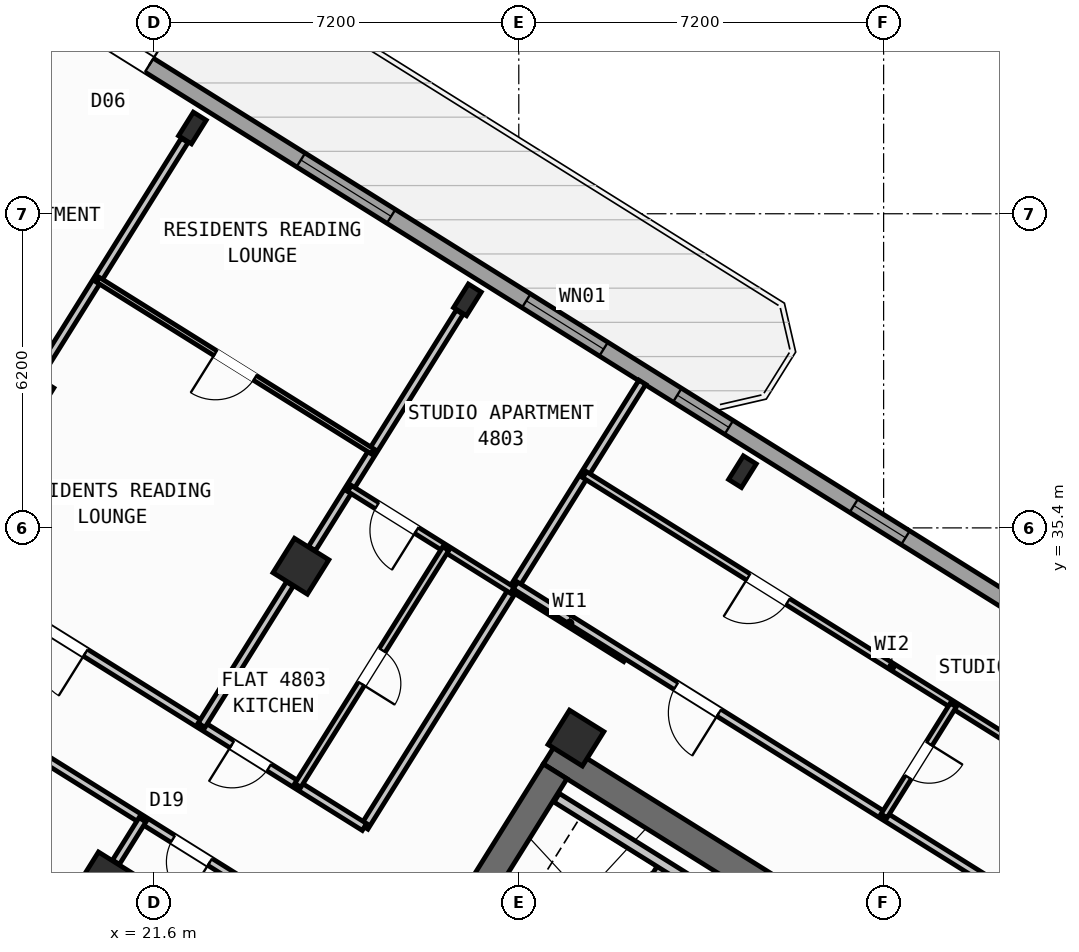
"""IFC4 building model, lengths in metres.
Left out: names, types, materials, properties, quantities, classifications, styles, units other than length and angle.
Written with IfcOpenShell. Run it as: python <this file> out.ifc"""

import sys

from ifc_helpers import new_model, si_unit, direction, frame, frame_2d, origin, origin_2d, place, context, subcontext, project, spatial, rectangle, hollow_rectangle, i_section, extrude, source, transform, mapped, element, fill, save


model = new_model("IFC4")
c1 = context("Model", 3, precision=1e-05, world=origin(), true_north=direction((0.0, 1.0)))
c2 = subcontext(c1, "Body", "Model", "MODEL_VIEW")
j1 = project(units=[si_unit("LENGTHUNIT", "METRE"), si_unit("PLANEANGLEUNIT", "RADIAN")], contexts=[c1])
p1 = place(None, origin())
s1 = spatial("IfcSite", under=j1, at=p1, CompositionType="ELEMENT")
p2 = place(p1, origin())
s2 = spatial("IfcBuilding", under=s1, at=p2, CompositionType="ELEMENT")
p3 = place(p2, frame((0.0, 0.0, 191.4)))
s3 = spatial("IfcBuildingStorey", under=s2, at=p3, CompositionType="ELEMENT", Elevation=191.4)
p4 = place(p3, frame((40.573, 24.01, 0.0), z_axis=(0.0, 0.0, 1.0), x_axis=(-0.848047359947, 0.529920442413, 0.0)))
e1 = element("IfcWall", 1, at=p4, inside=s3, PredefinedType="SHEAR", context=c2, shape_type="SweptSolid", body=[
    extrude(rectangle(XDim=13.14, YDim=0.55, at=frame_2d((6.57, 0.0))), origin(), (0.0, 0.0, 1.0), 3.32),
])
p5 = place(p3, frame((29.517, 30.594, 0.0), z_axis=(0.0, 0.0, 1.0), x_axis=(-0.529906864564, -0.848055844204, 0.0)))
e2 = element("IfcWall", 2, at=p5, inside=s3, PredefinedType="SHEAR", context=c2, shape_type="SweptSolid", body=[
    extrude(rectangle(XDim=3.575, YDim=0.55, at=frame_2d((1.788, 0.0))), origin(), (0.0, 0.0, 1.0), 3.32),
])
m1 = source(origin(), c2, "Body", "SweptSolid", [
    extrude(i_section(OverallWidth=0.3, OverallDepth=0.55, WebThickness=0.015, FlangeThickness=0.029, at=origin_2d()), origin(), (0.0, 0.0, 1.0), 3.6),
])
p6 = place(p3, frame((33.213, 36.509, 0.0), z_axis=(0.0, 0.0, 1.0), x_axis=(-0.848048096156, 0.529919264233, 0.0)))
e3 = element("IfcColumn", 3, at=p6, inside=s3, PredefinedType="COLUMN", context=c2, shape_type="MappedRepresentation", body=[
    mapped(m1, transform((0.0, 0.0, 0.0), scale=1.0)),
])
m2 = source(origin(), c2, "Body", "SweptSolid", [
    extrude(hollow_rectangle(XDim=0.8, YDim=0.8, WallThickness=0.032, at=origin_2d()), origin(), (0.0, 0.0, 1.0), 3.6),
])
p7 = place(p3, frame((29.928, 31.251, 0.0), z_axis=(0.0, 0.0, 1.0), x_axis=(-0.848048096156, 0.529919264233, 0.0)))
e4 = element("IfcColumn", 4, at=p7, inside=s3, PredefinedType="COLUMN", context=c2, shape_type="MappedRepresentation", body=[
    mapped(m2, transform((0.0, 0.0, 0.0), scale=1.0)),
])
p8 = place(p3, frame((27.786, 39.901, 0.0), z_axis=(0.0, 0.0, 1.0), x_axis=(-0.848048096156, 0.529919264233, 0.0)))
e5 = element("IfcColumn", 5, at=p8, inside=s3, PredefinedType="COLUMN", context=c2, shape_type="MappedRepresentation", body=[
    mapped(m1, transform((0.0, 0.0, 0.0), scale=1.0)),
])
for number, where, z_axis, x_axis in (
    (6, (24.5, 34.643, 0.0), (0.0, 0.0, 1.0), (-0.848, 0.53, 0.0)),
    (7, (20.632, 28.452, 0.0), (0.0, 0.0, 1.0), (-0.848, 0.53, 0.0)),
):
    element("IfcColumn", number, at=place(p3, frame(where, z_axis=z_axis, x_axis=x_axis)), inside=s3, PredefinedType="COLUMN", context=c2, shape_type="MappedRepresentation", body=[
        mapped(m2, transform((0.0, 0.0, 0.0), scale=1.0)),
    ])
p9 = place(p3, frame((22.358, 43.292, 0.0), z_axis=(0.0, 0.0, 1.0), x_axis=(-0.848048096156, 0.529919264233, 0.0)))
e8 = element("IfcColumn", 8, at=p9, inside=s3, PredefinedType="COLUMN", context=c2, shape_type="MappedRepresentation", body=[
    mapped(m1, transform((0.0, 0.0, 0.0), scale=1.0)),
])
p10 = place(p3, frame((19.073, 38.034, 0.0), z_axis=(0.0, 0.0, 1.0), x_axis=(-0.848048096156, 0.529919264233, 0.0)))
e9 = element("IfcColumn", 9, at=p10, inside=s3, PredefinedType="COLUMN", context=c2, shape_type="MappedRepresentation", body=[
    mapped(m2, transform((0.0, 0.0, 0.0), scale=1.0)),
])
p11 = place(p3, frame((17.424, 47.083, 0.0), z_axis=(0.0, 0.0, 1.0), x_axis=(0.848049927979, -0.529916332693, 0.0)))
e10 = element("IfcWall", 10, at=p11, inside=s3, PredefinedType="STANDARD", context=c2, shape_type="SweptSolid", body=[
    extrude(rectangle(XDim=29.223, YDim=0.32, at=frame_2d((14.612, 0.0))), origin(), (0.0, 0.0, 1.0), 3.32),
])
p12 = place(p11, frame((3.764, 0.0, 0.0)))
e11 = element("IfcOpeningElement", 11, at=p12, cuts=e10, PredefinedType="OPENING", context=c2, shape_type="SweptSolid", body=[
    extrude(rectangle(XDim=1.05, YDim=2.15, at=frame_2d((0.525, 1.075))), frame((0.0, 0.17, 0.0), z_axis=(0.0, -1.0, 0.0), x_axis=(1.0, 0.0, 0.0)), (0.0, 0.0, 1.0), 0.34),
])
p13 = place(p11, frame((8.344, 0.0, 0.8)))
e12 = element("IfcOpeningElement", 12, at=p13, cuts=e10, PredefinedType="OPENING", context=c2, shape_type="SweptSolid", body=[
    extrude(rectangle(XDim=2.1, YDim=1.55, at=frame_2d((1.05, 0.775))), frame((0.0, 0.17, 0.0), z_axis=(0.0, -1.0, 0.0), x_axis=(1.0, 0.0, 0.0)), (0.0, 0.0, 1.0), 0.34),
])
p14 = place(p11, frame((13.589, 0.0, 0.85)))
e13 = element("IfcOpeningElement", 13, at=p14, cuts=e10, PredefinedType="OPENING", context=c2, shape_type="SweptSolid", body=[
    extrude(rectangle(XDim=1.8, YDim=1.5, at=frame_2d((0.9, 0.75))), frame((0.0, 0.17, 0.0), z_axis=(0.0, -1.0, 0.0), x_axis=(1.0, 0.0, 0.0)), (0.0, 0.0, 1.0), 0.34),
])
p15 = place(p11, frame((17.104, 0.0, 0.95)))
e14 = element("IfcOpeningElement", 14, at=p15, cuts=e10, PredefinedType="OPENING", context=c2, shape_type="SweptSolid", body=[
    extrude(rectangle(XDim=1.2, YDim=1.4, at=frame_2d((0.6, 0.7))), frame((0.0, 0.17, 0.0), z_axis=(0.0, -1.0, 0.0), x_axis=(1.0, 0.0, 0.0)), (0.0, 0.0, 1.0), 0.34),
])
p16 = place(p11, frame((21.214, 0.0, 0.95)))
e15 = element("IfcOpeningElement", 15, at=p16, cuts=e10, PredefinedType="OPENING", context=c2, shape_type="SweptSolid", body=[
    extrude(rectangle(XDim=1.2, YDim=1.4, at=frame_2d((0.6, 0.7))), frame((0.0, 0.17, 0.0), z_axis=(0.0, -1.0, 0.0), x_axis=(1.0, 0.0, 0.0)), (0.0, 0.0, 1.0), 0.34),
])
p17 = place(p11, frame((25.853, 0.0, 0.95)))
e16 = element("IfcOpeningElement", 16, at=p17, cuts=e10, PredefinedType="OPENING", context=c2, shape_type="SweptSolid", body=[
    extrude(rectangle(XDim=1.2, YDim=1.4, at=frame_2d((0.6, 0.7))), frame((0.0, 0.17, 0.0), z_axis=(0.0, -1.0, 0.0), x_axis=(1.0, 0.0, 0.0)), (0.0, 0.0, 1.0), 0.34),
])
p18 = place(p3, frame((31.645, 28.716, 0.0), z_axis=(0.0, 0.0, 1.0), x_axis=(-0.52986693015, -0.848080795876, 0.0)))
e17 = element("IfcWall", 17, at=p18, inside=s3, PredefinedType="STANDARD", context=c2, shape_type="SweptSolid", body=[
    extrude(rectangle(XDim=2.66, YDim=0.2, at=frame_2d((1.33, 0.0))), origin(), (0.0, 0.0, 1.0), 3.31),
])
p19 = place(p3, frame((33.363, 27.69, 0.0), z_axis=(0.0, 0.0, 1.0), x_axis=(-0.848047090064, 0.529920874315, 0.0)))
e18 = element("IfcWall", 18, at=p19, inside=s3, PredefinedType="STANDARD", context=c2, shape_type="SweptSolid", body=[
    extrude(rectangle(XDim=4.498, YDim=0.2, at=frame_2d((2.249, 0.0))), origin(), (0.0, 0.0, 1.0), 3.31),
])
p20 = place(p3, frame((30.914, 32.829, 0.0), z_axis=(0.0, 0.0, 1.0), x_axis=(-0.848008813643, 0.529982124211, 0.0)))
e19 = element("IfcWall", 19, at=p20, inside=s3, PredefinedType="PARTITIONING", context=c2, shape_type="SweptSolid", body=[
    extrude(rectangle(XDim=2.61, YDim=0.16, at=frame_2d((1.305, 0.0))), origin(), (0.0, 0.0, 1.0), 3.31),
])
p21 = place(p3, frame((31.239, 38.274, 0.0), z_axis=(0.0, 0.0, 1.0), x_axis=(-0.529914125013, -0.848051307476, 0.0)))
e20 = element("IfcWall", 20, at=p21, inside=s3, PredefinedType="PARTITIONING", context=c2, shape_type="SweptSolid", body=[
    extrude(rectangle(XDim=10.35, YDim=0.16, at=frame_2d((5.175, 0.0))), origin(), (0.0, 0.0, 1.0), 3.31),
])
p22 = place(p3, frame((25.754, 29.497, 0.0), z_axis=(0.0, 0.0, 1.0), x_axis=(-0.848045850158, 0.529922858565, 0.0)))
e21 = element("IfcWall", 21, at=p22, inside=s3, PredefinedType="PARTITIONING", context=c2, shape_type="SweptSolid", body=[
    extrude(rectangle(XDim=16.73, YDim=0.16, at=frame_2d((8.365, 0.0))), origin(), (0.0, 0.0, 1.0), 3.31),
])
p23 = place(p22, frame((2.22, 0.0, 0.0)))
e22 = element("IfcOpeningElement", 22, at=p23, cuts=e21, PredefinedType="OPENING", context=c2, shape_type="SweptSolid", body=[
    extrude(rectangle(XDim=0.86, YDim=2.05, at=frame_2d((0.43, 1.025))), frame((0.0, 0.09, 0.0), z_axis=(0.0, -1.0, 0.0), x_axis=(1.0, 0.0, 0.0)), (0.0, 0.0, 1.0), 0.18),
])
p24 = place(p22, frame((6.49, 0.0, 0.0)))
e23 = element("IfcOpeningElement", 23, at=p24, cuts=e21, PredefinedType="OPENING", context=c2, shape_type="SweptSolid", body=[
    extrude(rectangle(XDim=1.0, YDim=2.1, at=frame_2d((0.5, 1.05))), frame((0.0, 0.09, 0.0), z_axis=(0.0, -1.0, 0.0), x_axis=(1.0, 0.0, 0.0)), (0.0, 0.0, 1.0), 0.18),
])
p25 = place(p22, frame((14.304, 0.0, 0.0)))
e24 = element("IfcOpeningElement", 24, at=p25, cuts=e21, PredefinedType="OPENING", context=c2, shape_type="SweptSolid", body=[
    extrude(rectangle(XDim=1.0, YDim=2.1, at=frame_2d((0.5, 1.05))), frame((0.0, 0.09, 0.0), z_axis=(0.0, -1.0, 0.0), x_axis=(1.0, 0.0, 0.0)), (0.0, 0.0, 1.0), 0.18),
])
p26 = place(p3, frame((24.588, 27.631, 0.0), z_axis=(0.0, 0.0, 1.0), x_axis=(-0.848041752158, 0.529929416617, 0.0)))
e25 = element("IfcWall", 25, at=p26, inside=s3, PredefinedType="PARTITIONING", context=c2, shape_type="SweptSolid", body=[
    extrude(rectangle(XDim=16.73, YDim=0.16, at=frame_2d((8.365, 0.0))), origin(), (0.0, 0.0, 1.0), 3.31),
])
p27 = place(p26, frame((2.22, 0.0, 0.0)))
e26 = element("IfcOpeningElement", 26, at=p27, cuts=e25, PredefinedType="OPENING", context=c2, shape_type="SweptSolid", body=[
    extrude(rectangle(XDim=0.86, YDim=2.05, at=frame_2d((0.43, 1.025))), frame((0.0, 0.09, 0.0), z_axis=(0.0, -1.0, 0.0), x_axis=(1.0, 0.0, 0.0)), (0.0, 0.0, 1.0), 0.18),
])
p28 = place(p26, frame((7.82, 0.0, 0.0)))
e27 = element("IfcOpeningElement", 27, at=p28, cuts=e25, PredefinedType="OPENING", context=c2, shape_type="SweptSolid", body=[
    extrude(rectangle(XDim=1.0, YDim=2.1, at=frame_2d((0.5, 1.05))), frame((0.0, 0.09, 0.0), z_axis=(0.0, -1.0, 0.0), x_axis=(1.0, 0.0, 0.0)), (0.0, 0.0, 1.0), 0.18),
])
p29 = place(p26, frame((12.95, 0.0, 0.0)))
e28 = element("IfcOpeningElement", 28, at=p29, cuts=e25, PredefinedType="OPENING", context=c2, shape_type="SweptSolid", body=[
    extrude(rectangle(XDim=1.0, YDim=2.1, at=frame_2d((0.5, 1.05))), frame((0.0, 0.09, 0.0), z_axis=(0.0, -1.0, 0.0), x_axis=(1.0, 0.0, 0.0)), (0.0, 0.0, 1.0), 0.18),
])
p30 = place(p3, frame((21.374, 29.639, 0.0), z_axis=(0.0, 0.0, 1.0), x_axis=(-0.529998940003, -0.847998304005, 0.0)))
e29 = element("IfcWall", 29, at=p30, inside=s3, PredefinedType="PARTITIONING", context=c2, shape_type="SweptSolid", body=[
    extrude(rectangle(XDim=0.988, YDim=0.16, at=frame_2d((0.494, 0.0))), origin(), (0.0, 0.0, 1.0), 2.795),
])
p31 = place(p3, frame((27.634, 39.657, 0.0), z_axis=(0.0, 0.0, 1.0), x_axis=(-0.529899205623, -0.848060629837, 0.0)))
e30 = element("IfcWall", 30, at=p31, inside=s3, PredefinedType="PARTITIONING", context=c2, shape_type="SweptSolid", body=[
    extrude(rectangle(XDim=5.501, YDim=0.16, at=frame_2d((2.75, 0.0))), origin(), (0.0, 0.0, 1.0), 2.795),
])
p32 = place(p3, frame((24.282, 34.293, 0.0), z_axis=(0.0, 0.0, 1.0), x_axis=(-0.529938869374, -0.84803584519, 0.0)))
e31 = element("IfcWall", 31, at=p32, inside=s3, PredefinedType="PARTITIONING", context=c2, shape_type="SweptSolid", body=[
    extrude(rectangle(XDim=3.288, YDim=0.16, at=frame_2d((1.644, 0.0))), origin(), (0.0, 0.0, 1.0), 2.795),
])
p33 = place(p3, frame((28.674, 34.169, 0.0), z_axis=(0.0, 0.0, 1.0), x_axis=(-0.848059820872, 0.529900500304, 0.0)))
e32 = element("IfcWall", 32, at=p33, inside=s3, PredefinedType="PLUMBINGWALL", context=c2, shape_type="SweptSolid", body=[
    extrude(rectangle(XDim=3.79, YDim=0.14, at=frame_2d((1.895, 0.0))), origin(), (0.0, 0.0, 1.0), 3.31),
])
p34 = place(p33, frame((2.23, 0.0, 0.0)))
e33 = element("IfcOpeningElement", 33, at=p34, cuts=e32, PredefinedType="OPENING", context=c2, shape_type="SweptSolid", body=[
    extrude(rectangle(XDim=0.92, YDim=2.08, at=frame_2d((0.46, 1.04))), frame((0.0, 0.08, 0.0), z_axis=(0.0, -1.0, 0.0), x_axis=(1.0, 0.0, 0.0)), (0.0, 0.0, 1.0), 0.16),
])
p35 = place(p3, frame((27.359, 34.991, 0.0), z_axis=(0.0, 0.0, 1.0), x_axis=(-0.529907329021, -0.848055553988, 0.0)))
e34 = element("IfcWall", 34, at=p35, inside=s3, PredefinedType="PLUMBINGWALL", context=c2, shape_type="SweptSolid", body=[
    extrude(rectangle(XDim=5.51, YDim=0.14, at=frame_2d((2.755, 0.0))), origin(), (0.0, 0.0, 1.0), 2.935),
])
p36 = place(p35, frame((2.365, 0.0, 0.0)))
e35 = element("IfcOpeningElement", 35, at=p36, cuts=e34, PredefinedType="OPENING", context=c2, shape_type="SweptSolid", body=[
    extrude(rectangle(XDim=0.78, YDim=2.05, at=frame_2d((0.39, 1.025))), frame((0.0, 0.08, 0.0), z_axis=(0.0, -1.0, 0.0), x_axis=(1.0, 0.0, 0.0)), (0.0, 0.0, 1.0), 0.16),
])
p37 = place(p3, frame((22.206, 43.049, 0.0), z_axis=(0.0, 0.0, 1.0), x_axis=(-0.529919150083, -0.848048167486, 0.0)))
e36 = element("IfcWall", 36, at=p37, inside=s3, PredefinedType="PARTITIONING", context=c2, shape_type="SweptSolid", body=[
    extrude(rectangle(XDim=5.501, YDim=0.16, at=frame_2d((2.75, 0.0))), origin(), (0.0, 0.0, 1.0), 2.795),
])
p38 = place(p3, frame((25.916, 36.909, 0.0), z_axis=(0.0, 0.0, 1.0), x_axis=(-0.848056163074, 0.529906354247, 0.0)))
e37 = element("IfcWall", 37, at=p38, inside=s3, PredefinedType="PARTITIONING", context=c2, shape_type="SweptSolid", body=[
    extrude(rectangle(XDim=6.4, YDim=0.11, at=frame_2d((3.2, 0.0))), origin(), (0.0, 0.0, 1.0), 3.31),
])
p39 = place(p38, frame((2.74, 0.0, 0.0)))
e38 = element("IfcOpeningElement", 38, at=p39, cuts=e37, PredefinedType="OPENING", context=c2, shape_type="SweptSolid", body=[
    extrude(rectangle(XDim=0.92, YDim=2.08, at=frame_2d((0.46, 1.04))), frame((0.0, 0.065, 0.0), z_axis=(0.0, -1.0, 0.0), x_axis=(1.0, 0.0, 0.0)), (0.0, 0.0, 1.0), 0.13),
])
p40 = place(p3, frame((41.936, 26.012, 0.0), z_axis=(0.0, 0.0, 1.0), x_axis=(-0.848051154596, 0.529914369676, 0.0)))
e39 = element("IfcWall", 39, at=p40, inside=s3, PredefinedType="PARTITIONING", context=c2, shape_type="SweptSolid", body=[
    extrude(rectangle(XDim=15.57, YDim=0.16, at=frame_2d((7.785, 0.0))), origin(), (0.0, 0.0, 1.0), 3.31),
])
p41 = place(p40, frame((10.83, 0.0, 0.0)))
e40 = element("IfcOpeningElement", 40, at=p41, cuts=e39, PredefinedType="OPENING", context=c2, shape_type="SweptSolid", body=[
    extrude(rectangle(XDim=1.0, YDim=2.1, at=frame_2d((0.5, 1.05))), frame((0.0, 0.09, 0.0), z_axis=(0.0, -1.0, 0.0), x_axis=(1.0, 0.0, 0.0)), (0.0, 0.0, 1.0), 0.18),
])
p42 = place(p3, frame((42.226, 28.873, 0.0), z_axis=(0.0, 0.0, 1.0), x_axis=(-0.848049134363, 0.529917602752, 0.0)))
e41 = element("IfcWall", 41, at=p42, inside=s3, PredefinedType="PLUMBINGWALL", context=c2, shape_type="SweptSolid", body=[
    extrude(rectangle(XDim=14.3, YDim=0.14, at=frame_2d((7.15, 0.0))), origin(), (0.0, 0.0, 1.0), 3.31),
])
p43 = place(p42, frame((9.57, 0.0, 0.0)))
e42 = element("IfcOpeningElement", 42, at=p43, cuts=e41, PredefinedType="OPENING", context=c2, shape_type="SweptSolid", body=[
    extrude(rectangle(XDim=0.92, YDim=2.08, at=frame_2d((0.46, 1.04))), frame((0.0, 0.08, 0.0), z_axis=(0.0, -1.0, 0.0), x_axis=(1.0, 0.0, 0.0)), (0.0, 0.0, 1.0), 0.16),
])
p44 = place(p3, frame((37.375, 31.904, 0.0), z_axis=(0.0, 0.0, 1.0), x_axis=(-0.529913878929, -0.848051461244, 0.0)))
e43 = element("IfcWall", 43, at=p44, inside=s3, PredefinedType="PLUMBINGWALL", context=c2, shape_type="SweptSolid", body=[
    extrude(rectangle(XDim=2.58, YDim=0.14, at=frame_2d((1.29, 0.0))), origin(), (0.0, 0.0, 1.0), 3.31),
])
p45 = place(p44, frame((0.9, 0.0, 0.0)))
e44 = element("IfcOpeningElement", 44, at=p45, cuts=e43, PredefinedType="OPENING", context=c2, shape_type="SweptSolid", body=[
    extrude(rectangle(XDim=0.78, YDim=2.05, at=frame_2d((0.39, 1.025))), frame((0.0, 0.08, 0.0), z_axis=(0.0, -1.0, 0.0), x_axis=(1.0, 0.0, 0.0)), (0.0, 0.0, 1.0), 0.16),
])
m3 = source(origin(), c2, "Body", "SweptSolid", [
    extrude(rectangle(XDim=1.05, YDim=2.15, at=frame_2d((0.525, 1.075))), frame((0.0, 0.025, 0.0), z_axis=(0.0, -1.0, 0.0), x_axis=(1.0, 0.0, 0.0)), (0.0, 0.0, 1.0), 0.05),
])
p46 = place(p12, origin())
e45 = element("IfcDoor", 45, at=p46, inside=s3, OperationType="SINGLE_SWING_RIGHT", PredefinedType="DOOR", context=c2, shape_type="MappedRepresentation", body=[
    mapped(m3, transform((0.0, 0.0, 0.0), scale=1.0)),
])
fill(e11, e45)
m4 = source(origin(), c2, "Body", "SweptSolid", [
    extrude(rectangle(XDim=2.1, YDim=1.55, at=frame_2d((1.05, 0.775))), frame((0.0, 0.03, 0.0), z_axis=(0.0, -1.0, 0.0), x_axis=(1.0, 0.0, 0.0)), (0.0, 0.0, 1.0), 0.06),
])
p47 = place(p13, origin())
e46 = element("IfcWindow", 46, at=p47, inside=s3, PartitioningType="SINGLE_PANEL", PredefinedType="WINDOW", context=c2, shape_type="MappedRepresentation", body=[
    mapped(m4, transform((0.0, 0.0, 0.0), scale=1.0)),
])
fill(e12, e46)
m5 = source(origin(), c2, "Body", "SweptSolid", [
    extrude(rectangle(XDim=1.8, YDim=1.5, at=frame_2d((0.9, 0.75))), frame((0.0, 0.03, 0.0), z_axis=(0.0, -1.0, 0.0), x_axis=(1.0, 0.0, 0.0)), (0.0, 0.0, 1.0), 0.06),
])
p48 = place(p14, origin())
e47 = element("IfcWindow", 47, at=p48, inside=s3, PartitioningType="SINGLE_PANEL", PredefinedType="WINDOW", context=c2, shape_type="MappedRepresentation", body=[
    mapped(m5, transform((0.0, 0.0, 0.0), scale=1.0)),
])
fill(e13, e47)
m6 = source(origin(), c2, "Body", "SweptSolid", [
    extrude(rectangle(XDim=1.2, YDim=1.4, at=frame_2d((0.6, 0.7))), frame((0.0, 0.03, 0.0), z_axis=(0.0, -1.0, 0.0), x_axis=(1.0, 0.0, 0.0)), (0.0, 0.0, 1.0), 0.06),
])
p49 = place(p15, origin())
e48 = element("IfcWindow", 48, at=p49, inside=s3, PartitioningType="SINGLE_PANEL", PredefinedType="WINDOW", context=c2, shape_type="MappedRepresentation", body=[
    mapped(m6, transform((0.0, 0.0, 0.0), scale=1.0)),
])
fill(e14, e48)
p50 = place(p16, origin())
e49 = element("IfcWindow", 49, at=p50, inside=s3, PartitioningType="SINGLE_PANEL", PredefinedType="WINDOW", context=c2, shape_type="MappedRepresentation", body=[
    mapped(m6, transform((0.0, 0.0, 0.0), scale=1.0)),
])
fill(e15, e49)
m7 = source(origin(), c2, "Body", "SweptSolid", [
    extrude(rectangle(XDim=0.86, YDim=2.05, at=frame_2d((0.43, 1.025))), frame((0.0, 0.025, 0.0), z_axis=(0.0, -1.0, 0.0), x_axis=(1.0, 0.0, 0.0)), (0.0, 0.0, 1.0), 0.05),
])
p51 = place(p27, origin())
e50 = element("IfcDoor", 50, at=p51, inside=s3, OperationType="SINGLE_SWING_LEFT", PredefinedType="DOOR", context=c2, shape_type="MappedRepresentation", body=[
    mapped(m7, transform((0.0, 0.0, 0.0), scale=1.0)),
])
fill(e26, e50)
p52 = place(p23, origin())
e51 = element("IfcDoor", 51, at=p52, inside=s3, OperationType="SINGLE_SWING_RIGHT", PredefinedType="DOOR", context=c2, shape_type="MappedRepresentation", body=[
    mapped(m7, transform((0.0, 0.0, 0.0), scale=1.0)),
])
fill(e22, e51)
m8 = source(origin(), c2, "Body", "SweptSolid", [
    extrude(rectangle(XDim=0.92, YDim=2.08, at=frame_2d((0.46, 1.04))), frame((0.0, 0.025, 0.0), z_axis=(0.0, -1.0, 0.0), x_axis=(1.0, 0.0, 0.0)), (0.0, 0.0, 1.0), 0.05),
])
p53 = place(p34, origin())
e52 = element("IfcDoor", 52, at=p53, inside=s3, OperationType="SINGLE_SWING_LEFT", PredefinedType="DOOR", context=c2, shape_type="MappedRepresentation", body=[
    mapped(m8, transform((0.0, 0.0, 0.0), scale=1.0)),
])
fill(e33, e52)
m9 = source(origin(), c2, "Body", "SweptSolid", [
    extrude(rectangle(XDim=0.78, YDim=2.05, at=frame_2d((0.39, 1.025))), frame((0.0, 0.025, 0.0), z_axis=(0.0, -1.0, 0.0), x_axis=(1.0, 0.0, 0.0)), (0.0, 0.0, 1.0), 0.05),
])
p54 = place(p36, origin())
e53 = element("IfcDoor", 53, at=p54, inside=s3, OperationType="SINGLE_SWING_RIGHT", PredefinedType="DOOR", context=c2, shape_type="MappedRepresentation", body=[
    mapped(m9, transform((0.0, 0.0, 0.0), scale=1.0)),
])
fill(e35, e53)
m10 = source(origin(), c2, "Body", "SweptSolid", [
    extrude(rectangle(XDim=1.0, YDim=2.1, at=frame_2d((0.5, 1.05))), frame((0.0, 0.025, 0.0), z_axis=(0.0, -1.0, 0.0), x_axis=(1.0, 0.0, 0.0)), (0.0, 0.0, 1.0), 0.05),
])
p55 = place(p24, origin())
e54 = element("IfcDoor", 54, at=p55, inside=s3, OperationType="SINGLE_SWING_LEFT", PredefinedType="DOOR", context=c2, shape_type="MappedRepresentation", body=[
    mapped(m10, transform((0.0, 0.0, 0.0), scale=1.0)),
])
fill(e23, e54)
p56 = place(p39, origin())
e55 = element("IfcDoor", 55, at=p56, inside=s3, OperationType="SINGLE_SWING_RIGHT", PredefinedType="DOOR", context=c2, shape_type="MappedRepresentation", body=[
    mapped(m8, transform((0.0, 0.0, 0.0), scale=1.0)),
])
fill(e38, e55)
p57 = place(p41, origin())
e56 = element("IfcDoor", 56, at=p57, inside=s3, OperationType="SINGLE_SWING_LEFT", PredefinedType="DOOR", context=c2, shape_type="MappedRepresentation", body=[
    mapped(m10, transform((0.0, 0.0, 0.0), scale=1.0)),
])
fill(e40, e56)
p58 = place(p43, origin())
e57 = element("IfcDoor", 57, at=p58, inside=s3, OperationType="SINGLE_SWING_RIGHT", PredefinedType="DOOR", context=c2, shape_type="MappedRepresentation", body=[
    mapped(m8, transform((0.0, 0.0, 0.0), scale=1.0)),
])
fill(e42, e57)
p59 = place(p45, origin())
e58 = element("IfcDoor", 58, at=p59, inside=s3, OperationType="SINGLE_SWING_LEFT", PredefinedType="DOOR", context=c2, shape_type="MappedRepresentation", body=[
    mapped(m9, transform((0.0, 0.0, 0.0), scale=1.0)),
])
fill(e44, e58)
save(model, sys.argv[1])
